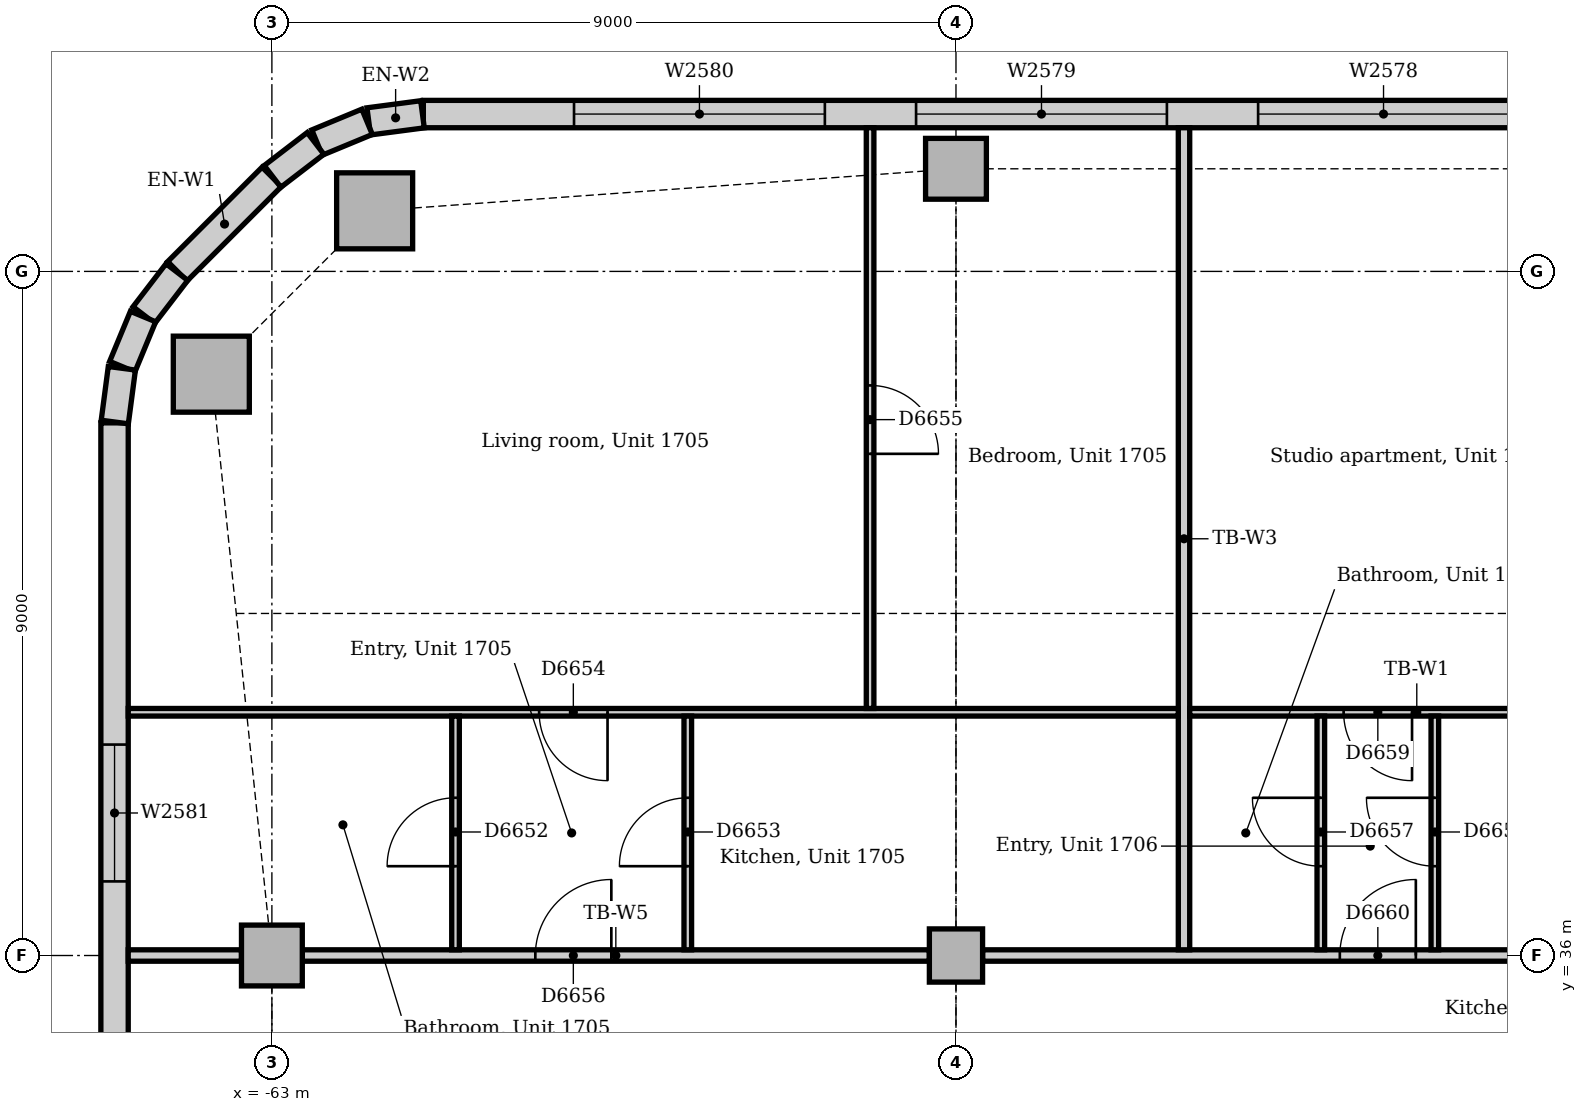
"""IFC4 building model, lengths in metres.
Left out: names, types, materials, properties, quantities, classifications, styles, units other than length and angle.
Written with IfcOpenShell. Run it as: python <this file> out.ifc"""

import sys

from ifc_helpers import new_model, si_unit, direction, frame, frame_2d, origin, origin_2d, place, context, subcontext, project, spatial, rectangle, extrude, element, fill, save


model = new_model("IFC4")
c1 = context("Model", 3, precision=1e-05, world=origin(), true_north=direction((0.0, 1.0)))
c2 = subcontext(c1, "Body", "Model", "MODEL_VIEW")
j1 = project(units=[si_unit("LENGTHUNIT", "METRE"), si_unit("PLANEANGLEUNIT", "RADIAN")], contexts=[c1])
p1 = place(None, origin())
s1 = spatial("IfcSite", under=j1, at=p1, CompositionType="ELEMENT")
p2 = place(p1, origin())
s2 = spatial("IfcBuilding", under=s1, at=p2, CompositionType="ELEMENT")
p3 = place(p2, frame((0.0, 0.0, 75.0)))
s3 = spatial("IfcBuildingStorey", under=s2, at=p3, CompositionType="ELEMENT", Elevation=75.0)
for number, where, z_axis, x_axis in (
    (1, (-61.648, 45.797, 0.0), (0.0, 0.0, 1.0), (1.0, 0.0, 0.0)),
    (2, (-63.797, 43.648, 0.0), (0.0, 0.0, 1.0), (1.0, 0.0, 0.0)),
):
    element("IfcColumn", number, at=place(p3, frame(where, z_axis=z_axis, x_axis=x_axis)), inside=s3, PredefinedType="COLUMN", context=c2, shape_type="SweptSolid", body=[
        extrude(rectangle(XDim=1.0, YDim=1.0, at=origin_2d()), origin(), (0.0, 0.0, 1.0), 3.85),
    ])
for number, where, z_axis, x_axis in (
    (3, (-54.0, 46.35, 0.0), (0.0, 0.0, 1.0), (1.0, 0.0, 0.0)),
    (4, (-63.0, 36.0, 0.0), (0.0, 0.0, 1.0), (1.0, 0.0, 0.0)),
):
    element("IfcColumn", number, at=place(p3, frame(where, z_axis=z_axis, x_axis=x_axis)), inside=s3, PredefinedType="COLUMN", context=c2, shape_type="SweptSolid", body=[
        extrude(rectangle(XDim=0.8, YDim=0.8, at=origin_2d()), origin(), (0.0, 0.0, 1.0), 3.85),
    ])
p4 = place(p3, frame((-54.0, 36.0, 0.0), z_axis=(0.0, 0.0, 1.0), x_axis=(1.0, 0.0, 0.0)))
e5 = element("IfcColumn", 5, at=p4, inside=s3, PredefinedType="COLUMN", context=c2, shape_type="SweptSolid", body=[
    extrude(rectangle(XDim=0.7, YDim=0.7, at=origin_2d()), origin(), (0.0, 0.0, 1.0), 3.85),
])
p5 = place(p3, frame((-31.243, 47.07, 0.0), z_axis=(0.0, 0.0, 1.0), x_axis=(-1.0, 0.0, 0.0)))
e6 = element("IfcWall", 6, at=p5, inside=s3, PredefinedType="STANDARD", context=c2, shape_type="SweptSolid", body=[
    extrude(rectangle(XDim=29.765, YDim=0.36, at=frame_2d((14.882, 0.0))), origin(), (0.0, 0.0, 1.0), 3.85),
])
p6 = place(p5, frame((1.982, 0.0, 0.9)))
e7 = element("IfcOpeningElement", 7, at=p6, cuts=e6, PredefinedType="OPENING", context=c2, shape_type="SweptSolid", body=[
    extrude(rectangle(XDim=3.3, YDim=1.6, at=frame_2d((1.65, 0.8))), frame((0.0, 0.19, 0.0), z_axis=(0.0, -1.0, 0.0), x_axis=(1.0, 0.0, 0.0)), (0.0, 0.0, 1.0), 0.38),
])
p7 = place(p5, frame((6.482, 0.0, 0.9)))
e8 = element("IfcOpeningElement", 8, at=p7, cuts=e6, PredefinedType="OPENING", context=c2, shape_type="SweptSolid", body=[
    extrude(rectangle(XDim=3.3, YDim=1.6, at=frame_2d((1.65, 0.8))), frame((0.0, 0.19, 0.0), z_axis=(0.0, -1.0, 0.0), x_axis=(1.0, 0.0, 0.0)), (0.0, 0.0, 1.0), 0.38),
])
p8 = place(p5, frame((10.982, 0.0, 0.9)))
e9 = element("IfcOpeningElement", 9, at=p8, cuts=e6, PredefinedType="OPENING", context=c2, shape_type="SweptSolid", body=[
    extrude(rectangle(XDim=3.3, YDim=1.6, at=frame_2d((1.65, 0.8))), frame((0.0, 0.19, 0.0), z_axis=(0.0, -1.0, 0.0), x_axis=(1.0, 0.0, 0.0)), (0.0, 0.0, 1.0), 0.38),
])
p9 = place(p5, frame((15.482, 0.0, 0.9)))
e10 = element("IfcOpeningElement", 10, at=p9, cuts=e6, PredefinedType="OPENING", context=c2, shape_type="SweptSolid", body=[
    extrude(rectangle(XDim=3.3, YDim=1.6, at=frame_2d((1.65, 0.8))), frame((0.0, 0.19, 0.0), z_axis=(0.0, -1.0, 0.0), x_axis=(1.0, 0.0, 0.0)), (0.0, 0.0, 1.0), 0.38),
])
p10 = place(p5, frame((19.982, 0.0, 0.9)))
e11 = element("IfcOpeningElement", 11, at=p10, cuts=e6, PredefinedType="OPENING", context=c2, shape_type="SweptSolid", body=[
    extrude(rectangle(XDim=3.3, YDim=1.6, at=frame_2d((1.65, 0.8))), frame((0.0, 0.19, 0.0), z_axis=(0.0, -1.0, 0.0), x_axis=(1.0, 0.0, 0.0)), (0.0, 0.0, 1.0), 0.38),
])
p11 = place(p5, frame((24.482, 0.0, 0.9)))
e12 = element("IfcOpeningElement", 12, at=p11, cuts=e6, PredefinedType="OPENING", context=c2, shape_type="SweptSolid", body=[
    extrude(rectangle(XDim=3.3, YDim=1.6, at=frame_2d((1.65, 0.8))), frame((0.0, 0.19, 0.0), z_axis=(0.0, -1.0, 0.0), x_axis=(1.0, 0.0, 0.0)), (0.0, 0.0, 1.0), 0.38),
])
p12 = place(p3, frame((-63.001, 46.244, 0.0), z_axis=(0.0, 0.0, 1.0), x_axis=(-0.707106781187, -0.707106781187, 0.0)))
e13 = element("IfcWall", 13, at=p12, inside=s3, PredefinedType="STANDARD", context=c2, shape_type="SweptSolid", body=[
    extrude(rectangle(XDim=1.757, YDim=0.36, at=frame_2d((0.879, 0.0))), origin(), (0.0, 0.0, 1.0), 3.85),
])
p13 = place(p3, frame((-65.07, 43.007, 0.0), z_axis=(0.0, 0.0, 1.0), x_axis=(0.0, -1.0, 0.0)))
e14 = element("IfcWall", 14, at=p13, inside=s3, PredefinedType="STANDARD", context=c2, shape_type="SweptSolid", body=[
    extrude(rectangle(XDim=23.765, YDim=0.36, at=frame_2d((11.882, 0.0))), origin(), (0.0, 0.0, 1.0), 3.85),
])
p14 = place(p13, frame((4.232, 0.0, 0.9)))
e15 = element("IfcOpeningElement", 15, at=p14, cuts=e14, PredefinedType="OPENING", context=c2, shape_type="SweptSolid", body=[
    extrude(rectangle(XDim=1.8, YDim=1.6, at=frame_2d((0.9, 0.8))), frame((0.0, 0.19, 0.0), z_axis=(0.0, -1.0, 0.0), x_axis=(1.0, 0.0, 0.0)), (0.0, 0.0, 1.0), 0.38),
])
p15 = place(p13, frame((9.332, 0.0, 0.9)))
e16 = element("IfcOpeningElement", 16, at=p15, cuts=e14, PredefinedType="OPENING", context=c2, shape_type="SweptSolid", body=[
    extrude(rectangle(XDim=1.8, YDim=1.6, at=frame_2d((0.9, 0.8))), frame((0.0, 0.19, 0.0), z_axis=(0.0, -1.0, 0.0), x_axis=(1.0, 0.0, 0.0)), (0.0, 0.0, 1.0), 0.38),
])
p16 = place(p13, frame((12.482, 0.0, 0.9)))
e17 = element("IfcOpeningElement", 17, at=p16, cuts=e14, PredefinedType="OPENING", context=c2, shape_type="SweptSolid", body=[
    extrude(rectangle(XDim=3.3, YDim=1.6, at=frame_2d((1.65, 0.8))), frame((0.0, 0.19, 0.0), z_axis=(0.0, -1.0, 0.0), x_axis=(1.0, 0.0, 0.0)), (0.0, 0.0, 1.0), 0.38),
])
p17 = place(p13, frame((16.982, 0.0, 0.9)))
e18 = element("IfcOpeningElement", 18, at=p17, cuts=e14, PredefinedType="OPENING", context=c2, shape_type="SweptSolid", body=[
    extrude(rectangle(XDim=3.3, YDim=1.6, at=frame_2d((1.65, 0.8))), frame((0.0, 0.19, 0.0), z_axis=(0.0, -1.0, 0.0), x_axis=(1.0, 0.0, 0.0)), (0.0, 0.0, 1.0), 0.38),
])
for number, where, z_axis, x_axis in (
    (19, (-61.019, 47.067, 0.0), (0.0, 0.0, 1.0), (-0.991, -0.131, 0.0)),
    (20, (-61.747, 46.968, 0.0), (0.0, 0.0, 1.0), (-0.924, -0.383, 0.0)),
):
    element("IfcWall", number, at=place(p3, frame(where, z_axis=z_axis, x_axis=x_axis)), inside=s3, PredefinedType="STANDARD", context=c2, shape_type="SweptSolid", body=[
        extrude(rectangle(XDim=0.713, YDim=0.36, at=frame_2d((0.356, 0.0))), origin(), (0.0, 0.0, 1.0), 3.85),
    ])
for number, where, z_axis, x_axis in (
    (21, (-62.425, 46.684, 0.0), (0.0, 0.0, 1.0), (-0.793, -0.609, 0.0)),
    (22, (-64.25, 44.991, 0.0), (0.0, 0.0, 1.0), (-0.609, -0.793, 0.0)),
):
    element("IfcWall", number, at=place(p3, frame(where, z_axis=z_axis, x_axis=x_axis)), inside=s3, PredefinedType="STANDARD", context=c2, shape_type="SweptSolid", body=[
        extrude(rectangle(XDim=0.713, YDim=0.36, at=frame_2d((0.357, 0.0))), origin(), (0.0, 0.0, 1.0), 3.85),
    ])
for number, where, z_axis, x_axis in (
    (23, (-64.695, 44.406, 0.0), (0.0, 0.0, 1.0), (-0.383, -0.924, 0.0)),
    (24, (-64.974, 43.726, 0.0), (0.0, 0.0, 1.0), (-0.131, -0.991, 0.0)),
):
    element("IfcWall", number, at=place(p3, frame(where, z_axis=z_axis, x_axis=x_axis)), inside=s3, PredefinedType="STANDARD", context=c2, shape_type="SweptSolid", body=[
        extrude(rectangle(XDim=0.713, YDim=0.36, at=frame_2d((0.356, 0.0))), origin(), (0.0, 0.0, 1.0), 3.85),
    ])
p18 = place(p3, frame((-53.65, 36.0, 0.0), z_axis=(0.0, 0.0, 1.0), x_axis=(1.0, 0.0, 0.0)))
e25 = element("IfcWall", 25, at=p18, inside=s3, PredefinedType="PARTITIONING", context=c2, shape_type="SweptSolid", body=[
    extrude(rectangle(XDim=8.3, YDim=0.15, at=frame_2d((4.15, 0.0))), origin(), (0.0, 0.0, 1.0), 3.158),
])
p19 = place(p18, frame((4.7, 0.0, 0.0)))
e26 = element("IfcOpeningElement", 26, at=p19, cuts=e25, PredefinedType="OPENING", context=c2, shape_type="SweptSolid", body=[
    extrude(rectangle(XDim=1.0, YDim=2.1, at=frame_2d((0.5, 1.05))), frame((0.0, 0.085, 0.0), z_axis=(0.0, -1.0, 0.0), x_axis=(1.0, 0.0, 0.0)), (0.0, 0.0, 1.0), 0.17),
])
p20 = place(p3, frame((-62.6, 36.0, 0.0), z_axis=(0.0, 0.0, 1.0), x_axis=(1.0, 0.0, 0.0)))
e27 = element("IfcWall", 27, at=p20, inside=s3, PredefinedType="PARTITIONING", context=c2, shape_type="SweptSolid", body=[
    extrude(rectangle(XDim=8.25, YDim=0.15, at=frame_2d((4.125, 0.0))), origin(), (0.0, 0.0, 1.0), 3.158),
])
p21 = place(p20, frame((3.066, 0.0, 0.0)))
e28 = element("IfcOpeningElement", 28, at=p21, cuts=e27, PredefinedType="OPENING", context=c2, shape_type="SweptSolid", body=[
    extrude(rectangle(XDim=1.0, YDim=2.1, at=frame_2d((0.5, 1.05))), frame((0.0, 0.085, 0.0), z_axis=(0.0, -1.0, 0.0), x_axis=(1.0, 0.0, 0.0)), (0.0, 0.0, 1.0), 0.17),
])
p22 = place(p3, frame((-64.89, 36.0, 0.0), z_axis=(0.0, 0.0, 1.0), x_axis=(1.0, 0.0, 0.0)))
e29 = element("IfcWall", 29, at=p22, inside=s3, PredefinedType="PARTITIONING", context=c2, shape_type="SweptSolid", body=[
    extrude(rectangle(XDim=1.49, YDim=0.15, at=frame_2d((0.745, 0.0))), origin(), (0.0, 0.0, 1.0), 3.85),
])
p23 = place(p3, frame((-51.0, 36.075, 0.0), z_axis=(0.0, 0.0, 1.0), x_axis=(0.0, 1.0, 0.0)))
e30 = element("IfcWall", 30, at=p23, inside=s3, PredefinedType="PARTITIONING", context=c2, shape_type="SweptSolid", body=[
    extrude(rectangle(XDim=10.815, YDim=0.15, at=frame_2d((5.407, 0.0))), origin(), (0.0, 0.0, 1.0), 3.85),
])
p24 = place(p3, frame((-50.925, 39.2, 0.0), z_axis=(0.0, 0.0, 1.0), x_axis=(1.0, 0.0, 0.0)))
e31 = element("IfcWall", 31, at=p24, inside=s3, PredefinedType="PARTITIONING", context=c2, shape_type="SweptSolid", body=[
    extrude(rectangle(XDim=5.975, YDim=0.1, at=frame_2d((2.987, 0.0))), origin(), (0.0, 0.0, 1.0), 3.85),
])
p25 = place(p24, frame((2.025, 0.0, 0.0)))
e32 = element("IfcOpeningElement", 32, at=p25, cuts=e31, PredefinedType="OPENING", context=c2, shape_type="SweptSolid", body=[
    extrude(rectangle(XDim=0.9, YDim=2.1, at=frame_2d((0.45, 1.05))), frame((0.0, 0.06, 0.0), z_axis=(0.0, -1.0, 0.0), x_axis=(1.0, 0.0, 0.0)), (0.0, 0.0, 1.0), 0.12),
])
p26 = place(p3, frame((-64.89, 39.2, 0.0), z_axis=(0.0, 0.0, 1.0), x_axis=(1.0, 0.0, 0.0)))
e33 = element("IfcWall", 33, at=p26, inside=s3, PredefinedType="PARTITIONING", context=c2, shape_type="SweptSolid", body=[
    extrude(rectangle(XDim=13.815, YDim=0.1, at=frame_2d((6.907, 0.0))), origin(), (0.0, 0.0, 1.0), 3.85),
])
p27 = place(p26, frame((5.406, 0.0, 0.0)))
e34 = element("IfcOpeningElement", 34, at=p27, cuts=e33, PredefinedType="OPENING", context=c2, shape_type="SweptSolid", body=[
    extrude(rectangle(XDim=0.9, YDim=2.1, at=frame_2d((0.45, 1.05))), frame((0.0, 0.06, 0.0), z_axis=(0.0, -1.0, 0.0), x_axis=(1.0, 0.0, 0.0)), (0.0, 0.0, 1.0), 0.12),
])
p28 = place(p3, frame((-55.13, 39.25, 0.0), z_axis=(0.0, 0.0, 1.0), x_axis=(0.0, 1.0, 0.0)))
e35 = element("IfcWall", 35, at=p28, inside=s3, PredefinedType="PARTITIONING", context=c2, shape_type="SweptSolid", body=[
    extrude(rectangle(XDim=7.64, YDim=0.1, at=frame_2d((3.82, 0.0))), origin(), (0.0, 0.0, 1.0), 3.85),
])
p29 = place(p28, frame((3.35, 0.0, 0.0)))
e36 = element("IfcOpeningElement", 36, at=p29, cuts=e35, PredefinedType="OPENING", context=c2, shape_type="SweptSolid", body=[
    extrude(rectangle(XDim=0.9, YDim=2.1, at=frame_2d((0.45, 1.05))), frame((0.0, 0.06, 0.0), z_axis=(0.0, -1.0, 0.0), x_axis=(1.0, 0.0, 0.0)), (0.0, 0.0, 1.0), 0.12),
])
p30 = place(p3, frame((-60.584, 36.075, 0.0), z_axis=(0.0, 0.0, 1.0), x_axis=(0.0, 1.0, 0.0)))
e37 = element("IfcWall", 37, at=p30, inside=s3, PredefinedType="PARTITIONING", context=c2, shape_type="SweptSolid", body=[
    extrude(rectangle(XDim=3.075, YDim=0.1, at=frame_2d((1.538, 0.0))), origin(), (0.0, 0.0, 1.0), 3.85),
])
p31 = place(p30, frame((1.1, 0.0, 0.0)))
e38 = element("IfcOpeningElement", 38, at=p31, cuts=e37, PredefinedType="OPENING", context=c2, shape_type="SweptSolid", body=[
    extrude(rectangle(XDim=0.9, YDim=2.1, at=frame_2d((0.45, 1.05))), frame((0.0, 0.06, 0.0), z_axis=(0.0, -1.0, 0.0), x_axis=(1.0, 0.0, 0.0)), (0.0, 0.0, 1.0), 0.12),
])
p32 = place(p3, frame((-57.528, 36.075, 0.0), z_axis=(0.0, 0.0, 1.0), x_axis=(0.0, 1.0, 0.0)))
e39 = element("IfcWall", 39, at=p32, inside=s3, PredefinedType="PARTITIONING", context=c2, shape_type="SweptSolid", body=[
    extrude(rectangle(XDim=3.075, YDim=0.1, at=frame_2d((1.538, 0.0))), origin(), (0.0, 0.0, 1.0), 3.85),
])
p33 = place(p32, frame((1.1, 0.0, 0.0)))
e40 = element("IfcOpeningElement", 40, at=p33, cuts=e39, PredefinedType="OPENING", context=c2, shape_type="SweptSolid", body=[
    extrude(rectangle(XDim=0.9, YDim=2.1, at=frame_2d((0.45, 1.05))), frame((0.0, 0.06, 0.0), z_axis=(0.0, -1.0, 0.0), x_axis=(1.0, 0.0, 0.0)), (0.0, 0.0, 1.0), 0.12),
])
p34 = place(p3, frame((-49.2, 36.075, 0.0), z_axis=(0.0, 0.0, 1.0), x_axis=(0.0, 1.0, 0.0)))
e41 = element("IfcWall", 41, at=p34, inside=s3, PredefinedType="PARTITIONING", context=c2, shape_type="SweptSolid", body=[
    extrude(rectangle(XDim=3.075, YDim=0.1, at=frame_2d((1.538, 0.0))), origin(), (0.0, 0.0, 1.0), 3.85),
])
p35 = place(p34, frame((1.1, 0.0, 0.0)))
e42 = element("IfcOpeningElement", 42, at=p35, cuts=e41, PredefinedType="OPENING", context=c2, shape_type="SweptSolid", body=[
    extrude(rectangle(XDim=0.9, YDim=2.1, at=frame_2d((0.45, 1.05))), frame((0.0, 0.06, 0.0), z_axis=(0.0, -1.0, 0.0), x_axis=(1.0, 0.0, 0.0)), (0.0, 0.0, 1.0), 0.12),
])
p36 = place(p3, frame((-47.7, 36.075, 0.0), z_axis=(0.0, 0.0, 1.0), x_axis=(0.0, 1.0, 0.0)))
e43 = element("IfcWall", 43, at=p36, inside=s3, PredefinedType="PARTITIONING", context=c2, shape_type="SweptSolid", body=[
    extrude(rectangle(XDim=3.075, YDim=0.1, at=frame_2d((1.538, 0.0))), origin(), (0.0, 0.0, 1.0), 3.85),
])
p37 = place(p36, frame((1.1, 0.0, 0.0)))
e44 = element("IfcOpeningElement", 44, at=p37, cuts=e43, PredefinedType="OPENING", context=c2, shape_type="SweptSolid", body=[
    extrude(rectangle(XDim=0.9, YDim=2.1, at=frame_2d((0.45, 1.05))), frame((0.0, 0.06, 0.0), z_axis=(0.0, -1.0, 0.0), x_axis=(1.0, 0.0, 0.0)), (0.0, 0.0, 1.0), 0.12),
])
p38 = place(p9, origin())
e45 = element("IfcWindow", 45, at=p38, inside=s3, PartitioningType="SINGLE_PANEL", PredefinedType="WINDOW", context=c2, shape_type="SweptSolid", body=[
    extrude(rectangle(XDim=3.3, YDim=1.6, at=frame_2d((1.65, 0.8))), frame((0.0, 0.13, 0.0), z_axis=(0.0, -1.0, 0.0), x_axis=(1.0, 0.0, 0.0)), (0.0, 0.0, 1.0), 0.06),
])
fill(e10, e45)
p39 = place(p10, origin())
e46 = element("IfcWindow", 46, at=p39, inside=s3, PartitioningType="SINGLE_PANEL", PredefinedType="WINDOW", context=c2, shape_type="SweptSolid", body=[
    extrude(rectangle(XDim=3.3, YDim=1.6, at=frame_2d((1.65, 0.8))), frame((0.0, 0.13, 0.0), z_axis=(0.0, -1.0, 0.0), x_axis=(1.0, 0.0, 0.0)), (0.0, 0.0, 1.0), 0.06),
])
fill(e11, e46)
p40 = place(p11, origin())
e47 = element("IfcWindow", 47, at=p40, inside=s3, PartitioningType="SINGLE_PANEL", PredefinedType="WINDOW", context=c2, shape_type="SweptSolid", body=[
    extrude(rectangle(XDim=3.3, YDim=1.6, at=frame_2d((1.65, 0.8))), frame((0.0, 0.13, 0.0), z_axis=(0.0, -1.0, 0.0), x_axis=(1.0, 0.0, 0.0)), (0.0, 0.0, 1.0), 0.06),
])
fill(e12, e47)
p41 = place(p14, origin())
e48 = element("IfcWindow", 48, at=p41, inside=s3, PartitioningType="SINGLE_PANEL", PredefinedType="WINDOW", context=c2, shape_type="SweptSolid", body=[
    extrude(rectangle(XDim=1.8, YDim=1.6, at=frame_2d((0.9, 0.8))), frame((0.0, 0.13, 0.0), z_axis=(0.0, -1.0, 0.0), x_axis=(1.0, 0.0, 0.0)), (0.0, 0.0, 1.0), 0.06),
])
fill(e15, e48)
p42 = place(p31, origin())
e49 = element("IfcDoor", 49, at=p42, inside=s3, OperationType="SINGLE_SWING_LEFT", PredefinedType="DOOR", context=c2, shape_type="SweptSolid", body=[
    extrude(rectangle(XDim=0.9, YDim=2.1, at=frame_2d((0.45, 1.05))), frame((0.0, 0.025, 0.0), z_axis=(0.0, -1.0, 0.0), x_axis=(1.0, 0.0, 0.0)), (0.0, 0.0, 1.0), 0.05),
])
fill(e38, e49)
p43 = place(p33, origin())
e50 = element("IfcDoor", 50, at=p43, inside=s3, OperationType="SINGLE_SWING_LEFT", PredefinedType="DOOR", context=c2, shape_type="SweptSolid", body=[
    extrude(rectangle(XDim=0.9, YDim=2.1, at=frame_2d((0.45, 1.05))), frame((0.0, 0.025, 0.0), z_axis=(0.0, -1.0, 0.0), x_axis=(1.0, 0.0, 0.0)), (0.0, 0.0, 1.0), 0.05),
])
fill(e40, e50)
p44 = place(p27, frame((0.9, 0.0, 0.0), z_axis=(0.0, 0.0, 1.0), x_axis=(-1.0, 0.0, 0.0)))
e51 = element("IfcDoor", 51, at=p44, inside=s3, OperationType="SINGLE_SWING_LEFT", PredefinedType="DOOR", context=c2, shape_type="SweptSolid", body=[
    extrude(rectangle(XDim=0.9, YDim=2.1, at=frame_2d((0.45, 1.05))), frame((0.0, 0.025, 0.0), z_axis=(0.0, -1.0, 0.0), x_axis=(1.0, 0.0, 0.0)), (0.0, 0.0, 1.0), 0.05),
])
fill(e34, e51)
p45 = place(p29, frame((0.9, 0.0, 0.0), z_axis=(0.0, 0.0, 1.0), x_axis=(-1.0, 0.0, 0.0)))
e52 = element("IfcDoor", 52, at=p45, inside=s3, OperationType="SINGLE_SWING_RIGHT", PredefinedType="DOOR", context=c2, shape_type="SweptSolid", body=[
    extrude(rectangle(XDim=0.9, YDim=2.1, at=frame_2d((0.45, 1.05))), frame((0.0, 0.025, 0.0), z_axis=(0.0, -1.0, 0.0), x_axis=(1.0, 0.0, 0.0)), (0.0, 0.0, 1.0), 0.05),
])
fill(e36, e52)
p46 = place(p21, origin())
e53 = element("IfcDoor", 53, at=p46, inside=s3, OperationType="SINGLE_SWING_RIGHT", PredefinedType="DOOR", context=c2, shape_type="SweptSolid", body=[
    extrude(rectangle(XDim=1.0, YDim=2.1, at=frame_2d((0.5, 1.05))), frame((0.0, 0.025, 0.0), z_axis=(0.0, -1.0, 0.0), x_axis=(1.0, 0.0, 0.0)), (0.0, 0.0, 1.0), 0.05),
])
fill(e28, e53)
p47 = place(p35, origin())
e54 = element("IfcDoor", 54, at=p47, inside=s3, OperationType="SINGLE_SWING_RIGHT", PredefinedType="DOOR", context=c2, shape_type="SweptSolid", body=[
    extrude(rectangle(XDim=0.9, YDim=2.1, at=frame_2d((0.45, 1.05))), frame((0.0, 0.025, 0.0), z_axis=(0.0, -1.0, 0.0), x_axis=(1.0, 0.0, 0.0)), (0.0, 0.0, 1.0), 0.05),
])
fill(e42, e54)
p48 = place(p37, origin())
e55 = element("IfcDoor", 55, at=p48, inside=s3, OperationType="SINGLE_SWING_RIGHT", PredefinedType="DOOR", context=c2, shape_type="SweptSolid", body=[
    extrude(rectangle(XDim=0.9, YDim=2.1, at=frame_2d((0.45, 1.05))), frame((0.0, 0.025, 0.0), z_axis=(0.0, -1.0, 0.0), x_axis=(1.0, 0.0, 0.0)), (0.0, 0.0, 1.0), 0.05),
])
fill(e44, e55)
p49 = place(p25, frame((0.9, 0.0, 0.0), z_axis=(0.0, 0.0, 1.0), x_axis=(-1.0, 0.0, 0.0)))
e56 = element("IfcDoor", 56, at=p49, inside=s3, OperationType="SINGLE_SWING_LEFT", PredefinedType="DOOR", context=c2, shape_type="SweptSolid", body=[
    extrude(rectangle(XDim=0.9, YDim=2.1, at=frame_2d((0.45, 1.05))), frame((0.0, 0.025, 0.0), z_axis=(0.0, -1.0, 0.0), x_axis=(1.0, 0.0, 0.0)), (0.0, 0.0, 1.0), 0.05),
])
fill(e32, e56)
p50 = place(p19, origin())
e57 = element("IfcDoor", 57, at=p50, inside=s3, OperationType="SINGLE_SWING_RIGHT", PredefinedType="DOOR", context=c2, shape_type="SweptSolid", body=[
    extrude(rectangle(XDim=1.0, YDim=2.1, at=frame_2d((0.5, 1.05))), frame((0.0, 0.025, 0.0), z_axis=(0.0, -1.0, 0.0), x_axis=(1.0, 0.0, 0.0)), (0.0, 0.0, 1.0), 0.05),
])
fill(e26, e57)
save(model, sys.argv[1])
